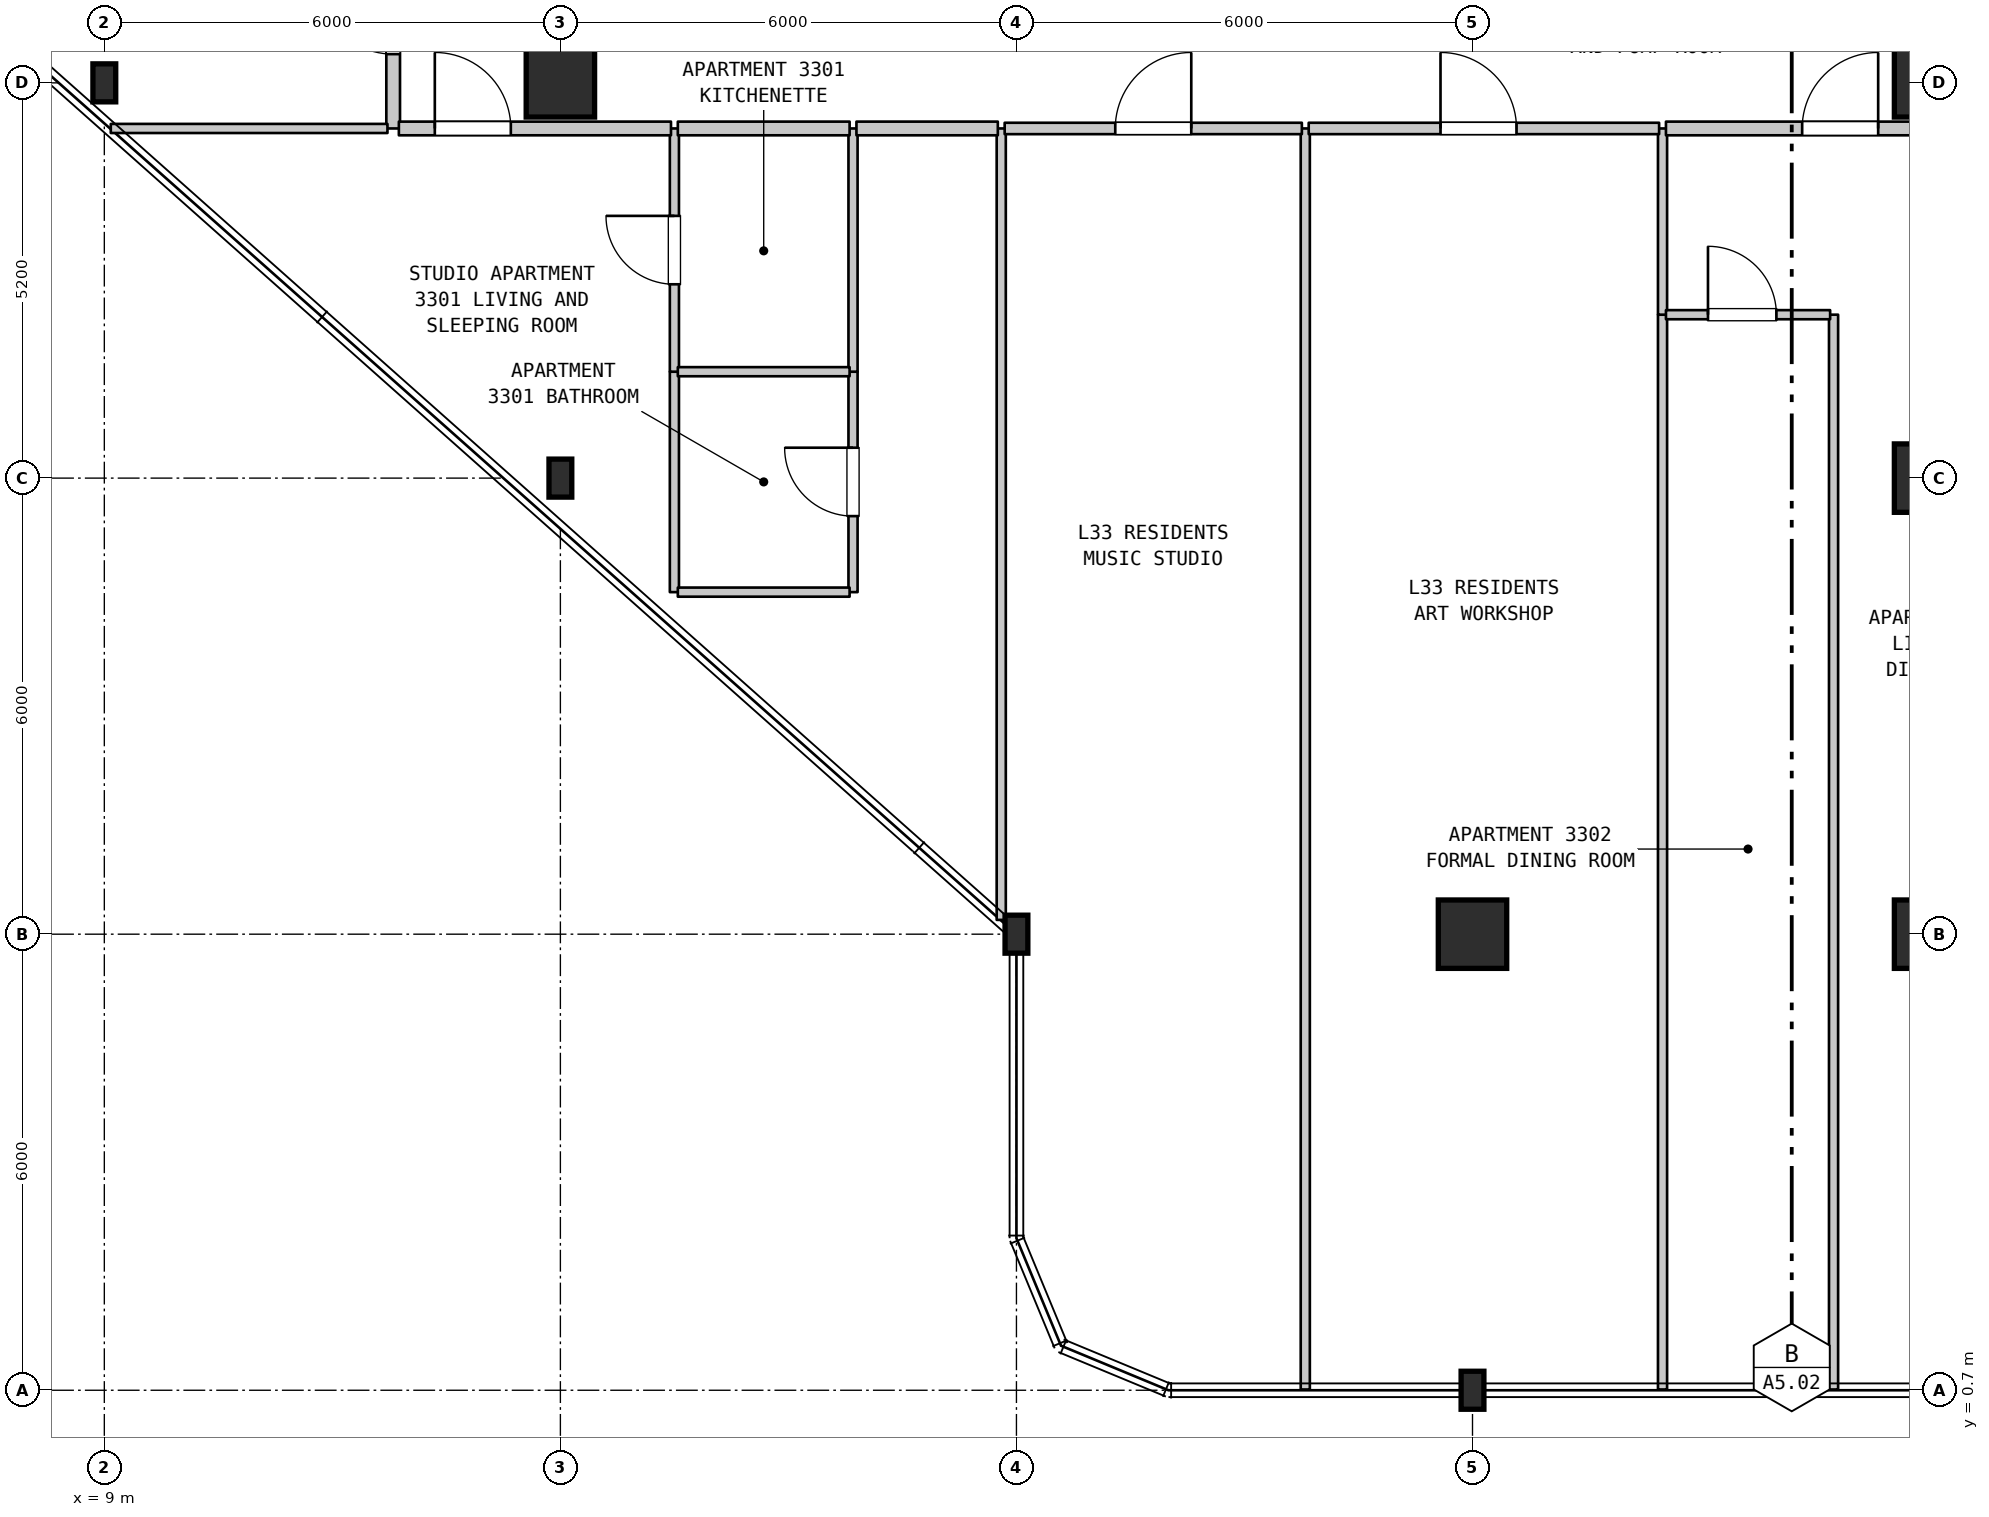
"""IFC4 building model, lengths in metres.
Left out: names, types, materials, properties, quantities, classifications, styles, units other than length and angle.
Written with IfcOpenShell. Run it as: python <this file> out.ifc"""

import sys

from ifc_helpers import new_model, si_unit, direction, frame, frame_2d, origin, origin_2d, place, context, subcontext, project, spatial, rectangle, i_section, extrude, element, fill, save


model = new_model("IFC4")
c1 = context("Model", 3, precision=1e-05, world=origin(), true_north=direction((0.0, 1.0)))
c2 = subcontext(c1, "Body", "Model", "MODEL_VIEW")
j1 = project(units=[si_unit("LENGTHUNIT", "METRE"), si_unit("PLANEANGLEUNIT", "RADIAN")], contexts=[c1])
p1 = place(None, origin())
s1 = spatial("IfcSite", under=j1, at=p1, CompositionType="ELEMENT")
p2 = place(p1, origin())
s2 = spatial("IfcBuilding", under=s1, at=p2, CompositionType="ELEMENT")
p3 = place(p2, frame((0.0, 0.0, 137.2)))
s3 = spatial("IfcBuildingStorey", under=s2, at=p3, CompositionType="ELEMENT", Elevation=137.2)
for number, where, z_axis, x_axis in (
    (1, (9.0, 17.9, 0.0), (0.0, 0.0, 1.0), (1.0, 0.0, 0.0)),
    (2, (15.0, 12.7, 0.0), (0.0, 0.0, 1.0), (1.0, 0.0, 0.0)),
):
    element("IfcColumn", number, at=place(p3, frame(where, z_axis=z_axis, x_axis=x_axis)), inside=s3, PredefinedType="COLUMN", context=c2, shape_type="SweptSolid", body=[
        extrude(i_section(OverallWidth=0.3, OverallDepth=0.5, WebThickness=0.014, FlangeThickness=0.028, FilletRadius=0.027, at=origin_2d()), origin(), (0.0, 0.0, 1.0), 3.7),
    ])
p4 = place(p3, frame((15.0, 17.9, 0.0), z_axis=(0.0, 0.0, 1.0), x_axis=(1.0, 0.0, 0.0)))
e3 = element("IfcColumn", 3, at=p4, inside=s3, PredefinedType="COLUMN", context=c2, shape_type="SweptSolid", body=[
    extrude(rectangle(XDim=0.9, YDim=0.9, at=origin_2d()), origin(), (0.0, 0.0, 1.0), 3.7),
])
for number, where, z_axis, x_axis in (
    (4, (21.0, 6.7, 0.0), (0.0, 0.0, 1.0), (1.0, 0.0, 0.0)),
    (5, (27.0, 0.7, 0.0), (0.0, 0.0, 1.0), (1.0, 0.0, 0.0)),
):
    element("IfcColumn", number, at=place(p3, frame(where, z_axis=z_axis, x_axis=x_axis)), inside=s3, PredefinedType="COLUMN", context=c2, shape_type="SweptSolid", body=[
        extrude(i_section(OverallWidth=0.3, OverallDepth=0.5, WebThickness=0.014, FlangeThickness=0.028, FilletRadius=0.027, at=origin_2d()), origin(), (0.0, 0.0, 1.0), 3.7),
    ])
for number, where, z_axis, x_axis in (
    (6, (27.0, 6.7, 0.0), (0.0, 0.0, 1.0), (1.0, 0.0, 0.0)),
    (7, (33.0, 6.7, 0.0), (0.0, 0.0, 1.0), (1.0, 0.0, 0.0)),
    (8, (33.0, 12.7, 0.0), (0.0, 0.0, 1.0), (1.0, 0.0, 0.0)),
    (9, (33.0, 17.9, 0.0), (0.0, 0.0, 1.0), (1.0, 0.0, 0.0)),
):
    element("IfcColumn", number, at=place(p3, frame(where, z_axis=z_axis, x_axis=x_axis)), inside=s3, PredefinedType="COLUMN", context=c2, shape_type="SweptSolid", body=[
        extrude(rectangle(XDim=0.9, YDim=0.9, at=origin_2d()), origin(), (0.0, 0.0, 1.0), 3.7),
    ])
p5 = place(p3, frame((12.8, 17.3, 0.0), z_axis=(0.0, 0.0, 1.0), x_axis=(0.0, 1.0, 0.0)))
e10 = element("IfcWall", 10, at=p5, inside=s3, PredefinedType="STANDARD", context=c2, shape_type="SweptSolid", body=[
    extrude(rectangle(XDim=3.1, YDim=0.18, at=frame_2d((1.55, 0.0))), origin(), (0.0, 0.0, 1.0), 3.385),
])
p6 = place(p5, frame((0.978, 0.0, 0.0)))
e11 = element("IfcOpeningElement", 11, at=p6, cuts=e10, PredefinedType="OPENING", context=c2, shape_type="SweptSolid", body=[
    extrude(rectangle(XDim=1.0, YDim=2.15, at=frame_2d((0.5, 1.075))), frame((0.0, 0.1, 0.0), z_axis=(0.0, -1.0, 0.0), x_axis=(1.0, 0.0, 0.0)), (0.0, 0.0, 1.0), 0.2),
])
p7 = place(p3, frame((16.5, 11.2, 0.0), z_axis=(0.0, 0.0, 1.0), x_axis=(0.0, 1.0, 0.0)))
e12 = element("IfcWall", 12, at=p7, inside=s3, PredefinedType="PARTITIONING", context=c2, shape_type="SweptSolid", body=[
    extrude(rectangle(XDim=2.9, YDim=0.12, at=frame_2d((1.45, 0.0))), origin(), (0.0, 0.0, 1.0), 3.385),
])
p8 = place(p3, frame((16.5, 14.1, 0.0), z_axis=(0.0, 0.0, 1.0), x_axis=(0.0, 1.0, 0.0)))
e13 = element("IfcWall", 13, at=p8, inside=s3, PredefinedType="PARTITIONING", context=c2, shape_type="SweptSolid", body=[
    extrude(rectangle(XDim=3.2, YDim=0.12, at=frame_2d((1.6, 0.0))), origin(), (0.0, 0.0, 1.0), 3.385),
])
p9 = place(p8, frame((1.15, 0.0, 0.0)))
e14 = element("IfcOpeningElement", 14, at=p9, cuts=e13, PredefinedType="OPENING", context=c2, shape_type="SweptSolid", body=[
    extrude(rectangle(XDim=0.9, YDim=2.15, at=frame_2d((0.45, 1.075))), frame((0.0, 0.07, 0.0), z_axis=(0.0, -1.0, 0.0), x_axis=(1.0, 0.0, 0.0)), (0.0, 0.0, 1.0), 0.14),
])
p10 = place(p3, frame((18.85, 11.2, 0.0), z_axis=(0.0, 0.0, 1.0), x_axis=(0.0, 1.0, 0.0)))
e15 = element("IfcWall", 15, at=p10, inside=s3, PredefinedType="PARTITIONING", context=c2, shape_type="SweptSolid", body=[
    extrude(rectangle(XDim=2.9, YDim=0.12, at=frame_2d((1.45, 0.0))), origin(), (0.0, 0.0, 1.0), 3.385),
])
p11 = place(p10, frame((1.0, 0.0, 0.0)))
e16 = element("IfcOpeningElement", 16, at=p11, cuts=e15, PredefinedType="OPENING", context=c2, shape_type="SweptSolid", body=[
    extrude(rectangle(XDim=0.9, YDim=2.1, at=frame_2d((0.45, 1.05))), frame((0.0, 0.07, 0.0), z_axis=(0.0, -1.0, 0.0), x_axis=(1.0, 0.0, 0.0)), (0.0, 0.0, 1.0), 0.14),
])
p12 = place(p3, frame((18.85, 14.1, 0.0), z_axis=(0.0, 0.0, 1.0), x_axis=(0.0, 1.0, 0.0)))
e17 = element("IfcWall", 17, at=p12, inside=s3, PredefinedType="PARTITIONING", context=c2, shape_type="SweptSolid", body=[
    extrude(rectangle(XDim=3.2, YDim=0.12, at=frame_2d((1.6, 0.0))), origin(), (0.0, 0.0, 1.0), 3.385),
])
p13 = place(p3, frame((20.8, 6.888, 0.0), z_axis=(0.0, 0.0, 1.0), x_axis=(0.0, 1.0, 0.0)))
e18 = element("IfcWall", 18, at=p13, inside=s3, PredefinedType="PARTITIONING", context=c2, shape_type="SweptSolid", body=[
    extrude(rectangle(XDim=10.412, YDim=0.12, at=frame_2d((5.206, 0.0))), origin(), (0.0, 0.0, 1.0), 3.385),
])
p14 = place(p3, frame((24.8, 0.71, 0.0), z_axis=(0.0, 0.0, 1.0), x_axis=(0.0, 1.0, 0.0)))
e19 = element("IfcWall", 19, at=p14, inside=s3, PredefinedType="PARTITIONING", context=c2, shape_type="SweptSolid", body=[
    extrude(rectangle(XDim=16.59, YDim=0.12, at=frame_2d((8.295, 0.0))), origin(), (0.0, 0.0, 1.0), 3.385),
])
p15 = place(p3, frame((29.5, 0.71, 0.0), z_axis=(0.0, 0.0, 1.0), x_axis=(0.0, 1.0, 0.0)))
e20 = element("IfcWall", 20, at=p15, inside=s3, PredefinedType="PARTITIONING", context=c2, shape_type="SweptSolid", body=[
    extrude(rectangle(XDim=14.14, YDim=0.12, at=frame_2d((7.07, 0.0))), origin(), (0.0, 0.0, 1.0), 3.385),
])
p16 = place(p3, frame((29.5, 14.85, 0.0), z_axis=(0.0, 0.0, 1.0), x_axis=(0.0, 1.0, 0.0)))
e21 = element("IfcWall", 21, at=p16, inside=s3, PredefinedType="PARTITIONING", context=c2, shape_type="SweptSolid", body=[
    extrude(rectangle(XDim=2.45, YDim=0.12, at=frame_2d((1.225, 0.0))), origin(), (0.0, 0.0, 1.0), 3.385),
])
p17 = place(p3, frame((31.75, 0.71, 0.0), z_axis=(0.0, 0.0, 1.0), x_axis=(0.0, 1.0, 0.0)))
e22 = element("IfcWall", 22, at=p17, inside=s3, PredefinedType="PARTITIONING", context=c2, shape_type="SweptSolid", body=[
    extrude(rectangle(XDim=14.14, YDim=0.12, at=frame_2d((7.07, 0.0))), origin(), (0.0, 0.0, 1.0), 3.385),
])
for number, where, z_axis, x_axis in (
    (23, (16.545, 11.2, 0.0), (0.0, 0.0, 1.0), (1.0, 0.0, 0.0)),
    (24, (16.545, 14.1, 0.0), (0.0, 0.0, 1.0), (1.0, 0.0, 0.0)),
):
    element("IfcWall", number, at=place(p3, frame(where, z_axis=z_axis, x_axis=x_axis)), inside=s3, PredefinedType="PARTITIONING", context=c2, shape_type="SweptSolid", body=[
        extrude(rectangle(XDim=2.26, YDim=0.12, at=frame_2d((1.13, 0.0))), origin(), (0.0, 0.0, 1.0), 3.385),
    ])
p18 = place(p3, frame((29.545, 14.85, 0.0), z_axis=(0.0, 0.0, 1.0), x_axis=(1.0, 0.0, 0.0)))
e25 = element("IfcWall", 25, at=p18, inside=s3, PredefinedType="PARTITIONING", context=c2, shape_type="SweptSolid", body=[
    extrude(rectangle(XDim=2.16, YDim=0.12, at=frame_2d((1.08, 0.0))), origin(), (0.0, 0.0, 1.0), 3.385),
])
p19 = place(p18, frame((0.553, 0.0, 0.0)))
e26 = element("IfcOpeningElement", 26, at=p19, cuts=e25, PredefinedType="OPENING", context=c2, shape_type="SweptSolid", body=[
    extrude(rectangle(XDim=0.9, YDim=2.15, at=frame_2d((0.45, 1.075))), frame((0.0, 0.07, 0.0), z_axis=(0.0, -1.0, 0.0), x_axis=(1.0, 0.0, 0.0)), (0.0, 0.0, 1.0), 0.14),
])
p20 = place(p3, frame((9.085, 17.3, 0.0), z_axis=(0.0, 0.0, 1.0), x_axis=(1.0, 0.0, 0.0)))
e27 = element("IfcWall", 27, at=p20, inside=s3, PredefinedType="PARTITIONING", context=c2, shape_type="SweptSolid", body=[
    extrude(rectangle(XDim=3.64, YDim=0.12, at=frame_2d((1.82, 0.0))), origin(), (0.0, 0.0, 1.0), 3.385),
])
p21 = place(p3, frame((12.875, 17.3, 0.0), z_axis=(0.0, 0.0, 1.0), x_axis=(1.0, 0.0, 0.0)))
e28 = element("IfcWall", 28, at=p21, inside=s3, PredefinedType="STANDARD", context=c2, shape_type="SweptSolid", body=[
    extrude(rectangle(XDim=3.58, YDim=0.18, at=frame_2d((1.79, 0.0))), origin(), (0.0, 0.0, 1.0), 3.385),
])
p22 = place(p21, frame((0.473, 0.0, 0.0)))
e29 = element("IfcOpeningElement", 29, at=p22, cuts=e28, PredefinedType="OPENING", context=c2, shape_type="SweptSolid", body=[
    extrude(rectangle(XDim=1.0, YDim=2.15, at=frame_2d((0.5, 1.075))), frame((0.0, 0.1, 0.0), z_axis=(0.0, -1.0, 0.0), x_axis=(1.0, 0.0, 0.0)), (0.0, 0.0, 1.0), 0.2),
])
p23 = place(p3, frame((16.545, 17.3, 0.0), z_axis=(0.0, 0.0, 1.0), x_axis=(1.0, 0.0, 0.0)))
e30 = element("IfcWall", 30, at=p23, inside=s3, PredefinedType="STANDARD", context=c2, shape_type="SweptSolid", body=[
    extrude(rectangle(XDim=2.26, YDim=0.18, at=frame_2d((1.13, 0.0))), origin(), (0.0, 0.0, 1.0), 3.385),
])
p24 = place(p3, frame((18.895, 17.3, 0.0), z_axis=(0.0, 0.0, 1.0), x_axis=(1.0, 0.0, 0.0)))
e31 = element("IfcWall", 31, at=p24, inside=s3, PredefinedType="STANDARD", context=c2, shape_type="SweptSolid", body=[
    extrude(rectangle(XDim=1.86, YDim=0.18, at=frame_2d((0.93, 0.0))), origin(), (0.0, 0.0, 1.0), 3.385),
])
p25 = place(p3, frame((20.845, 17.3, 0.0), z_axis=(0.0, 0.0, 1.0), x_axis=(1.0, 0.0, 0.0)))
e32 = element("IfcWall", 32, at=p25, inside=s3, PredefinedType="STANDARD", context=c2, shape_type="SweptSolid", body=[
    extrude(rectangle(XDim=3.91, YDim=0.15, at=frame_2d((1.955, 0.0))), origin(), (0.0, 0.0, 1.0), 3.385),
])
p26 = place(p25, frame((1.455, 0.0, 0.0)))
e33 = element("IfcOpeningElement", 33, at=p26, cuts=e32, PredefinedType="OPENING", context=c2, shape_type="SweptSolid", body=[
    extrude(rectangle(XDim=1.0, YDim=2.15, at=frame_2d((0.5, 1.075))), frame((0.0, 0.085, 0.0), z_axis=(0.0, -1.0, 0.0), x_axis=(1.0, 0.0, 0.0)), (0.0, 0.0, 1.0), 0.17),
])
p27 = place(p3, frame((24.845, 17.3, 0.0), z_axis=(0.0, 0.0, 1.0), x_axis=(1.0, 0.0, 0.0)))
e34 = element("IfcWall", 34, at=p27, inside=s3, PredefinedType="STANDARD", context=c2, shape_type="SweptSolid", body=[
    extrude(rectangle(XDim=4.61, YDim=0.15, at=frame_2d((2.305, 0.0))), origin(), (0.0, 0.0, 1.0), 3.385),
])
p28 = place(p27, frame((1.734, 0.0, 0.0)))
e35 = element("IfcOpeningElement", 35, at=p28, cuts=e34, PredefinedType="OPENING", context=c2, shape_type="SweptSolid", body=[
    extrude(rectangle(XDim=1.0, YDim=2.15, at=frame_2d((0.5, 1.075))), frame((0.0, 0.085, 0.0), z_axis=(0.0, -1.0, 0.0), x_axis=(1.0, 0.0, 0.0)), (0.0, 0.0, 1.0), 0.17),
])
p29 = place(p3, frame((29.545, 17.3, 0.0), z_axis=(0.0, 0.0, 1.0), x_axis=(1.0, 0.0, 0.0)))
e36 = element("IfcWall", 36, at=p29, inside=s3, PredefinedType="STANDARD", context=c2, shape_type="SweptSolid", body=[
    extrude(rectangle(XDim=5.095, YDim=0.18, at=frame_2d((2.547, 0.0))), origin(), (0.0, 0.0, 1.0), 3.385),
])
p30 = place(p29, frame((1.792, 0.0, 0.0)))
e37 = element("IfcOpeningElement", 37, at=p30, cuts=e36, PredefinedType="OPENING", context=c2, shape_type="SweptSolid", body=[
    extrude(rectangle(XDim=1.0, YDim=2.15, at=frame_2d((0.5, 1.075))), frame((0.0, 0.1, 0.0), z_axis=(0.0, -1.0, 0.0), x_axis=(1.0, 0.0, 0.0)), (0.0, 0.0, 1.0), 0.2),
])
p31 = place(p6, origin())
e38 = element("IfcDoor", 38, at=p31, inside=s3, OperationType="SINGLE_SWING_RIGHT", PredefinedType="DOOR", context=c2, shape_type="SweptSolid", body=[
    extrude(rectangle(XDim=1.0, YDim=2.15, at=frame_2d((0.5, 1.075))), frame((0.0, 0.025, 0.0), z_axis=(0.0, -1.0, 0.0), x_axis=(1.0, 0.0, 0.0)), (0.0, 0.0, 1.0), 0.05),
])
fill(e11, e38)
p32 = place(p9, origin())
e39 = element("IfcDoor", 39, at=p32, inside=s3, OperationType="SINGLE_SWING_RIGHT", PredefinedType="DOOR", context=c2, shape_type="SweptSolid", body=[
    extrude(rectangle(XDim=0.9, YDim=2.15, at=frame_2d((0.45, 1.075))), frame((0.0, 0.025, 0.0), z_axis=(0.0, -1.0, 0.0), x_axis=(1.0, 0.0, 0.0)), (0.0, 0.0, 1.0), 0.05),
])
fill(e14, e39)
p33 = place(p11, origin())
e40 = element("IfcDoor", 40, at=p33, inside=s3, OperationType="SINGLE_SWING_RIGHT", PredefinedType="DOOR", context=c2, shape_type="SweptSolid", body=[
    extrude(rectangle(XDim=0.9, YDim=2.1, at=frame_2d((0.45, 1.05))), frame((0.0, 0.025, 0.0), z_axis=(0.0, -1.0, 0.0), x_axis=(1.0, 0.0, 0.0)), (0.0, 0.0, 1.0), 0.05),
])
fill(e16, e40)
p34 = place(p19, origin())
e41 = element("IfcDoor", 41, at=p34, inside=s3, OperationType="SINGLE_SWING_LEFT", PredefinedType="DOOR", context=c2, shape_type="SweptSolid", body=[
    extrude(rectangle(XDim=0.9, YDim=2.15, at=frame_2d((0.45, 1.075))), frame((0.0, 0.025, 0.0), z_axis=(0.0, -1.0, 0.0), x_axis=(1.0, 0.0, 0.0)), (0.0, 0.0, 1.0), 0.05),
])
fill(e26, e41)
p35 = place(p22, origin())
e42 = element("IfcDoor", 42, at=p35, inside=s3, OperationType="SINGLE_SWING_LEFT", PredefinedType="DOOR", context=c2, shape_type="SweptSolid", body=[
    extrude(rectangle(XDim=1.0, YDim=2.15, at=frame_2d((0.5, 1.075))), frame((0.0, 0.025, 0.0), z_axis=(0.0, -1.0, 0.0), x_axis=(1.0, 0.0, 0.0)), (0.0, 0.0, 1.0), 0.05),
])
fill(e29, e42)
p36 = place(p26, origin())
e43 = element("IfcDoor", 43, at=p36, inside=s3, OperationType="SINGLE_SWING_RIGHT", PredefinedType="DOOR", context=c2, shape_type="SweptSolid", body=[
    extrude(rectangle(XDim=1.0, YDim=2.15, at=frame_2d((0.5, 1.075))), frame((0.0, 0.025, 0.0), z_axis=(0.0, -1.0, 0.0), x_axis=(1.0, 0.0, 0.0)), (0.0, 0.0, 1.0), 0.05),
])
fill(e33, e43)
p37 = place(p28, origin())
e44 = element("IfcDoor", 44, at=p37, inside=s3, OperationType="SINGLE_SWING_LEFT", PredefinedType="DOOR", context=c2, shape_type="SweptSolid", body=[
    extrude(rectangle(XDim=1.0, YDim=2.15, at=frame_2d((0.5, 1.075))), frame((0.0, 0.025, 0.0), z_axis=(0.0, -1.0, 0.0), x_axis=(1.0, 0.0, 0.0)), (0.0, 0.0, 1.0), 0.05),
])
fill(e35, e44)
p38 = place(p30, origin())
e45 = element("IfcDoor", 45, at=p38, inside=s3, OperationType="SINGLE_SWING_RIGHT", PredefinedType="DOOR", context=c2, shape_type="SweptSolid", body=[
    extrude(rectangle(XDim=1.0, YDim=2.15, at=frame_2d((0.5, 1.075))), frame((0.0, 0.025, 0.0), z_axis=(0.0, -1.0, 0.0), x_axis=(1.0, 0.0, 0.0)), (0.0, 0.0, 1.0), 0.05),
])
fill(e37, e45)
save(model, sys.argv[1])
